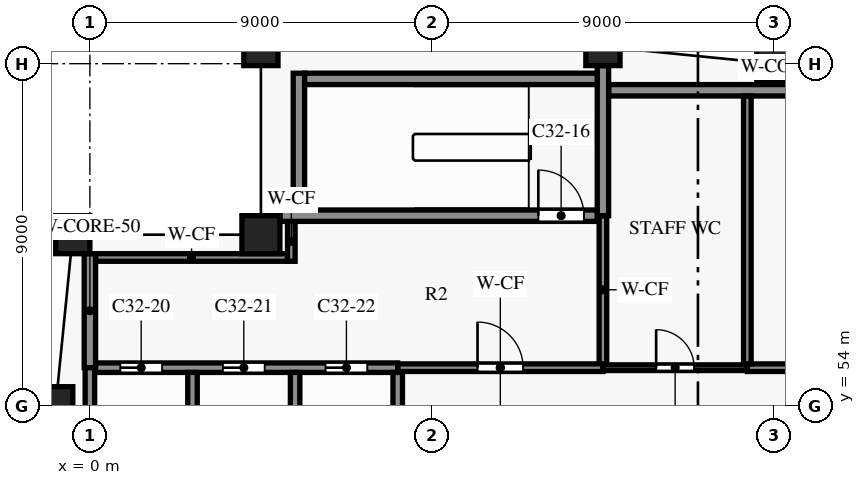
"""IFC4 building model, lengths in metres.
Left out: names, types, materials, properties, quantities, classifications, styles, units other than length and angle.
Written with IfcOpenShell. Run it as: python <this file> out.ifc"""

import sys

from ifc_helpers import new_model, si_unit, direction, frame, frame_2d, origin, origin_2d, place, context, subcontext, project, spatial, rectangle, extrude, element, fill, save


model = new_model("IFC4")
c1 = context("Model", 3, precision=1e-05, world=origin(), true_north=direction((0.0, 1.0)))
c2 = subcontext(c1, "Body", "Model", "MODEL_VIEW")
j1 = project(units=[si_unit("LENGTHUNIT", "METRE"), si_unit("PLANEANGLEUNIT", "RADIAN")], contexts=[c1])
p1 = place(None, origin())
s1 = spatial("IfcSite", under=j1, at=p1, CompositionType="ELEMENT")
p2 = place(p1, origin())
s2 = spatial("IfcBuilding", under=s1, at=p2, CompositionType="ELEMENT")
p3 = place(p2, frame((0.0, 0.0, 240.6)))
s3 = spatial("IfcBuildingStorey", under=s2, at=p3, CompositionType="ELEMENT", Elevation=240.6)
for number, where, z_axis, x_axis in (
    (1, (18.0, 63.0, 0.0), (0.0, 0.0, 1.0), (-1.0, 0.0, 0.0)),
    (2, (13.5, 63.45, 0.0), (0.0, 0.0, 1.0), (-0.995, 0.1, 0.0)),
    (3, (4.5, 63.45, 0.0), (0.0, 0.0, 1.0), (-0.995, -0.1, 0.0)),
    (4, (-0.45, 58.5, 0.0), (0.0, 0.0, 1.0), (-0.1, -0.995, 0.0)),
    (5, (-0.9, 54.0, 0.0), (0.0, 0.0, 1.0), (0.0, -1.0, 0.0)),
):
    element("IfcColumn", number, at=place(p3, frame(where, z_axis=z_axis, x_axis=x_axis)), inside=s3, PredefinedType="COLUMN", context=c2, shape_type="SweptSolid", body=[
        extrude(rectangle(XDim=0.9, YDim=1.0, at=origin_2d()), origin(), (0.0, 0.0, 1.0), 3.8),
    ])
p4 = place(p3, frame((4.5, 58.5, 0.0), z_axis=(0.0, 0.0, 1.0), x_axis=(1.0, 0.0, 0.0)))
e6 = element("IfcColumn", 6, at=p4, inside=s3, PredefinedType="COLUMN", context=c2, shape_type="SweptSolid", body=[
    extrude(rectangle(XDim=1.0, YDim=1.0, at=origin_2d()), origin(), (0.0, 0.0, 1.0), 3.8),
])
p5 = place(p3, frame((8.1, 55.0, 0.0), z_axis=(0.0, 0.0, 1.0), x_axis=(1.0, 0.0, 0.0)))
e7 = element("IfcWall", 7, at=p5, inside=s3, PredefinedType="PARTITIONING", context=c2, shape_type="SweptSolid", body=[
    extrude(rectangle(XDim=5.4, YDim=0.2, at=frame_2d((2.7, 0.0))), origin(), (0.0, 0.0, 1.0), 3.5),
])
p6 = place(p5, frame((2.1, 0.0, 0.0)))
e8 = element("IfcOpeningElement", 8, at=p6, cuts=e7, PredefinedType="OPENING", context=c2, shape_type="SweptSolid", body=[
    extrude(rectangle(XDim=1.2, YDim=2.2, at=frame_2d((0.6, 1.1))), frame((0.0, 0.11, 0.0), z_axis=(0.0, -1.0, 0.0), x_axis=(1.0, 0.0, 0.0)), (0.0, 0.0, 1.0), 0.22),
])
p7 = place(p3, frame((13.5, 55.0, 0.0), z_axis=(0.0, 0.0, 1.0), x_axis=(1.0, 0.0, 0.0)))
e9 = element("IfcWall", 9, at=p7, inside=s3, PredefinedType="PARTITIONING", context=c2, shape_type="SweptSolid", body=[
    extrude(rectangle(XDim=3.8, YDim=0.15, at=frame_2d((1.9, 0.0))), origin(), (0.0, 0.0, 1.0), 3.5),
])
p8 = place(p7, frame((1.4, 0.0, 0.0)))
e10 = element("IfcOpeningElement", 10, at=p8, cuts=e9, PredefinedType="OPENING", context=c2, shape_type="SweptSolid", body=[
    extrude(rectangle(XDim=1.0, YDim=2.1, at=frame_2d((0.5, 1.05))), frame((0.0, 0.085, 0.0), z_axis=(0.0, -1.0, 0.0), x_axis=(1.0, 0.0, 0.0)), (0.0, 0.0, 1.0), 0.17),
])
p9 = place(p3, frame((17.3, 55.0, 0.0), z_axis=(0.0, 0.0, 1.0), x_axis=(1.0, 0.0, 0.0)))
e11 = element("IfcWall", 11, at=p9, inside=s3, PredefinedType="PARTITIONING", context=c2, shape_type="SweptSolid", body=[
    extrude(rectangle(XDim=6.1, YDim=0.2, at=frame_2d((3.05, 0.0))), origin(), (0.0, 0.0, 1.0), 3.5),
])
p10 = place(p9, frame((2.55, 0.0, 0.0)))
e12 = element("IfcOpeningElement", 12, at=p10, cuts=e11, PredefinedType="OPENING", context=c2, shape_type="SweptSolid", body=[
    extrude(rectangle(XDim=1.0, YDim=2.1, at=frame_2d((0.5, 1.05))), frame((0.0, 0.11, 0.0), z_axis=(0.0, -1.0, 0.0), x_axis=(1.0, 0.0, 0.0)), (0.0, 0.0, 1.0), 0.22),
])
p11 = place(p3, frame((0.15, 55.0, 0.0), z_axis=(0.0, 0.0, 1.0), x_axis=(1.0, 0.0, 0.0)))
e13 = element("IfcWall", 13, at=p11, inside=s3, PredefinedType="SHEAR", context=c2, shape_type="SweptSolid", body=[
    extrude(rectangle(XDim=7.95, YDim=0.25, at=frame_2d((3.975, 0.0))), origin(), (0.0, 0.0, 1.0), 3.5),
])
p12 = place(p11, frame((0.65, 0.0, 0.0)))
e14 = element("IfcOpeningElement", 14, at=p12, cuts=e13, PredefinedType="OPENING", context=c2, shape_type="SweptSolid", body=[
    extrude(rectangle(XDim=1.1, YDim=2.1, at=frame_2d((0.55, 1.05))), frame((0.0, 0.135, 0.0), z_axis=(0.0, -1.0, 0.0), x_axis=(1.0, 0.0, 0.0)), (0.0, 0.0, 1.0), 0.27),
])
p13 = place(p11, frame((3.35, 0.0, 0.0)))
e15 = element("IfcOpeningElement", 15, at=p13, cuts=e13, PredefinedType="OPENING", context=c2, shape_type="SweptSolid", body=[
    extrude(rectangle(XDim=1.1, YDim=2.1, at=frame_2d((0.55, 1.05))), frame((0.0, 0.135, 0.0), z_axis=(0.0, -1.0, 0.0), x_axis=(1.0, 0.0, 0.0)), (0.0, 0.0, 1.0), 0.27),
])
p14 = place(p11, frame((6.05, 0.0, 0.0)))
e16 = element("IfcOpeningElement", 16, at=p14, cuts=e13, PredefinedType="OPENING", context=c2, shape_type="SweptSolid", body=[
    extrude(rectangle(XDim=1.1, YDim=2.1, at=frame_2d((0.55, 1.05))), frame((0.0, 0.135, 0.0), z_axis=(0.0, -1.0, 0.0), x_axis=(1.0, 0.0, 0.0)), (0.0, 0.0, 1.0), 0.27),
])
p15 = place(p3, frame((0.15, 57.9, 0.0), z_axis=(0.0, 0.0, 1.0), x_axis=(1.0, 0.0, 0.0)))
e17 = element("IfcWall", 17, at=p15, inside=s3, PredefinedType="PARTITIONING", context=c2, shape_type="SweptSolid", body=[
    extrude(rectangle(XDim=5.05, YDim=0.2, at=frame_2d((2.525, 0.0))), origin(), (0.0, 0.0, 1.0), 3.5),
])
p16 = place(p3, frame((5.0, 59.0, 0.0), z_axis=(0.0, 0.0, 1.0), x_axis=(1.0, 0.0, 0.0)))
e18 = element("IfcWall", 18, at=p16, inside=s3, PredefinedType="SHEAR", context=c2, shape_type="SweptSolid", body=[
    extrude(rectangle(XDim=8.35, YDim=0.3, at=frame_2d((4.175, 0.0))), origin(), (0.0, 0.0, 1.0), 3.5),
])
p17 = place(p16, frame((6.8, 0.0, 0.0)))
e19 = element("IfcOpeningElement", 19, at=p17, cuts=e18, PredefinedType="OPENING", context=c2, shape_type="SweptSolid", body=[
    extrude(rectangle(XDim=1.2, YDim=2.2, at=frame_2d((0.6, 1.1))), frame((0.0, 0.16, 0.0), z_axis=(0.0, -1.0, 0.0), x_axis=(1.0, 0.0, 0.0)), (0.0, 0.0, 1.0), 0.32),
])
p18 = place(p3, frame((13.65, 62.3, 0.0), z_axis=(0.0, 0.0, 1.0), x_axis=(1.0, 0.0, 0.0)))
e20 = element("IfcWall", 20, at=p18, inside=s3, PredefinedType="SHEAR", context=c2, shape_type="SweptSolid", body=[
    extrude(rectangle(XDim=9.6, YDim=0.3, at=frame_2d((4.8, 0.0))), origin(), (0.0, 0.0, 1.0), 3.5),
])
p19 = place(p3, frame((5.65, 62.6, 0.0), z_axis=(0.0, 0.0, 1.0), x_axis=(1.0, 0.0, 0.0)))
e21 = element("IfcWall", 21, at=p19, inside=s3, PredefinedType="SHEAR", context=c2, shape_type="SweptSolid", body=[
    extrude(rectangle(XDim=7.7, YDim=0.3, at=frame_2d((3.85, 0.0))), origin(), (0.0, 0.0, 1.0), 3.5),
])
p20 = place(p3, frame((0.0, 55.0, 0.0), z_axis=(0.0, 0.0, 1.0), x_axis=(0.0, 1.0, 0.0)))
e22 = element("IfcWall", 22, at=p20, inside=s3, PredefinedType="SHEAR", context=c2, shape_type="SweptSolid", body=[
    extrude(rectangle(XDim=3.0, YDim=0.3, at=frame_2d((1.5, 0.0))), origin(), (0.0, 0.0, 1.0), 3.5),
])
p21 = place(p3, frame((0.0, 51.65, 0.0), z_axis=(0.0, 0.0, 1.0), x_axis=(0.0, 1.0, 0.0)))
e23 = element("IfcWall", 23, at=p21, inside=s3, PredefinedType="SHEAR", context=c2, shape_type="SweptSolid", body=[
    extrude(rectangle(XDim=3.35, YDim=0.25, at=frame_2d((1.675, 0.0))), origin(), (0.0, 0.0, 1.0), 3.5),
])
p22 = place(p3, frame((2.7, 51.925, 0.0), z_axis=(0.0, 0.0, 1.0), x_axis=(0.0, 1.0, 0.0)))
e24 = element("IfcWall", 24, at=p22, inside=s3, PredefinedType="SHEAR", context=c2, shape_type="SweptSolid", body=[
    extrude(rectangle(XDim=2.95, YDim=0.25, at=frame_2d((1.475, 0.0))), origin(), (0.0, 0.0, 1.0), 3.5),
])
p23 = place(p3, frame((5.3, 57.8, 0.0), z_axis=(0.0, 0.0, 1.0), x_axis=(0.0, 1.0, 0.0)))
e25 = element("IfcWall", 25, at=p23, inside=s3, PredefinedType="PARTITIONING", context=c2, shape_type="SweptSolid", body=[
    extrude(rectangle(XDim=1.05, YDim=0.2, at=frame_2d((0.525, 0.0))), origin(), (0.0, 0.0, 1.0), 3.5),
])
p24 = place(p3, frame((5.4, 51.925, 0.0), z_axis=(0.0, 0.0, 1.0), x_axis=(0.0, 1.0, 0.0)))
e26 = element("IfcWall", 26, at=p24, inside=s3, PredefinedType="SHEAR", context=c2, shape_type="SweptSolid", body=[
    extrude(rectangle(XDim=2.95, YDim=0.25, at=frame_2d((1.475, 0.0))), origin(), (0.0, 0.0, 1.0), 3.5),
])
p25 = place(p3, frame((5.5, 59.15, 0.0), z_axis=(0.0, 0.0, 1.0), x_axis=(0.0, 1.0, 0.0)))
e27 = element("IfcWall", 27, at=p25, inside=s3, PredefinedType="SHEAR", context=c2, shape_type="SweptSolid", body=[
    extrude(rectangle(XDim=3.6, YDim=0.3, at=frame_2d((1.8, 0.0))), origin(), (0.0, 0.0, 1.0), 3.5),
])
p26 = place(p3, frame((8.1, 51.925, 0.0), z_axis=(0.0, 0.0, 1.0), x_axis=(0.0, 1.0, 0.0)))
e28 = element("IfcWall", 28, at=p26, inside=s3, PredefinedType="SHEAR", context=c2, shape_type="SweptSolid", body=[
    extrude(rectangle(XDim=2.95, YDim=0.25, at=frame_2d((1.475, 0.0))), origin(), (0.0, 0.0, 1.0), 3.5),
])
p27 = place(p3, frame((13.5, 55.1, 0.0), z_axis=(0.0, 0.0, 1.0), x_axis=(0.0, 1.0, 0.0)))
e29 = element("IfcWall", 29, at=p27, inside=s3, PredefinedType="PARTITIONING", context=c2, shape_type="SweptSolid", body=[
    extrude(rectangle(XDim=3.9, YDim=0.2, at=frame_2d((1.95, 0.0))), origin(), (0.0, 0.0, 1.0), 3.5),
])
p28 = place(p3, frame((13.5, 59.0, 0.0), z_axis=(0.0, 0.0, 1.0), x_axis=(0.0, 1.0, 0.0)))
e30 = element("IfcWall", 30, at=p28, inside=s3, PredefinedType="SHEAR", context=c2, shape_type="SweptSolid", body=[
    extrude(rectangle(XDim=3.948, YDim=0.3, at=frame_2d((1.974, 0.0))), origin(), (0.0, 0.0, 1.0), 3.5),
])
p29 = place(p3, frame((17.3, 55.1, 0.0), z_axis=(0.0, 0.0, 1.0), x_axis=(0.0, 1.0, 0.0)))
e31 = element("IfcWall", 31, at=p29, inside=s3, PredefinedType="PARTITIONING", context=c2, shape_type="SweptSolid", body=[
    extrude(rectangle(XDim=7.05, YDim=0.2, at=frame_2d((3.525, 0.0))), origin(), (0.0, 0.0, 1.0), 3.5),
])
p30 = place(p6, origin())
e32 = element("IfcDoor", 32, at=p30, inside=s3, OperationType="SINGLE_SWING_RIGHT", PredefinedType="DOOR", context=c2, shape_type="SweptSolid", body=[
    extrude(rectangle(XDim=1.2, YDim=2.2, at=frame_2d((0.6, 1.1))), frame((0.0, 0.025, 0.0), z_axis=(0.0, -1.0, 0.0), x_axis=(1.0, 0.0, 0.0)), (0.0, 0.0, 1.0), 0.05),
])
fill(e8, e32)
p31 = place(p8, origin())
e33 = element("IfcDoor", 33, at=p31, inside=s3, OperationType="SINGLE_SWING_LEFT", PredefinedType="DOOR", context=c2, shape_type="SweptSolid", body=[
    extrude(rectangle(XDim=1.0, YDim=2.1, at=frame_2d((0.5, 1.05))), frame((0.0, 0.025, 0.0), z_axis=(0.0, -1.0, 0.0), x_axis=(1.0, 0.0, 0.0)), (0.0, 0.0, 1.0), 0.05),
])
fill(e10, e33)
p32 = place(p17, origin())
e34 = element("IfcDoor", 34, at=p32, inside=s3, OperationType="SINGLE_SWING_RIGHT", PredefinedType="DOOR", context=c2, shape_type="SweptSolid", body=[
    extrude(rectangle(XDim=1.2, YDim=2.2, at=frame_2d((0.6, 1.1))), frame((0.0, 0.025, 0.0), z_axis=(0.0, -1.0, 0.0), x_axis=(1.0, 0.0, 0.0)), (0.0, 0.0, 1.0), 0.05),
])
fill(e19, e34)
p33 = place(p12, origin())
e35 = element("IfcDoor", 35, at=p33, inside=s3, OperationType="DOUBLE_DOOR_SLIDING", PredefinedType="DOOR", context=c2, shape_type="SweptSolid", body=[
    extrude(rectangle(XDim=1.1, YDim=2.1, at=frame_2d((0.55, 1.05))), frame((0.0, 0.025, 0.0), z_axis=(0.0, -1.0, 0.0), x_axis=(1.0, 0.0, 0.0)), (0.0, 0.0, 1.0), 0.05),
])
fill(e14, e35)
p34 = place(p13, origin())
e36 = element("IfcDoor", 36, at=p34, inside=s3, OperationType="DOUBLE_DOOR_SLIDING", PredefinedType="DOOR", context=c2, shape_type="SweptSolid", body=[
    extrude(rectangle(XDim=1.1, YDim=2.1, at=frame_2d((0.55, 1.05))), frame((0.0, 0.025, 0.0), z_axis=(0.0, -1.0, 0.0), x_axis=(1.0, 0.0, 0.0)), (0.0, 0.0, 1.0), 0.05),
])
fill(e15, e36)
p35 = place(p14, origin())
e37 = element("IfcDoor", 37, at=p35, inside=s3, OperationType="DOUBLE_DOOR_SLIDING", PredefinedType="DOOR", context=c2, shape_type="SweptSolid", body=[
    extrude(rectangle(XDim=1.1, YDim=2.1, at=frame_2d((0.55, 1.05))), frame((0.0, 0.025, 0.0), z_axis=(0.0, -1.0, 0.0), x_axis=(1.0, 0.0, 0.0)), (0.0, 0.0, 1.0), 0.05),
])
fill(e16, e37)
save(model, sys.argv[1])
